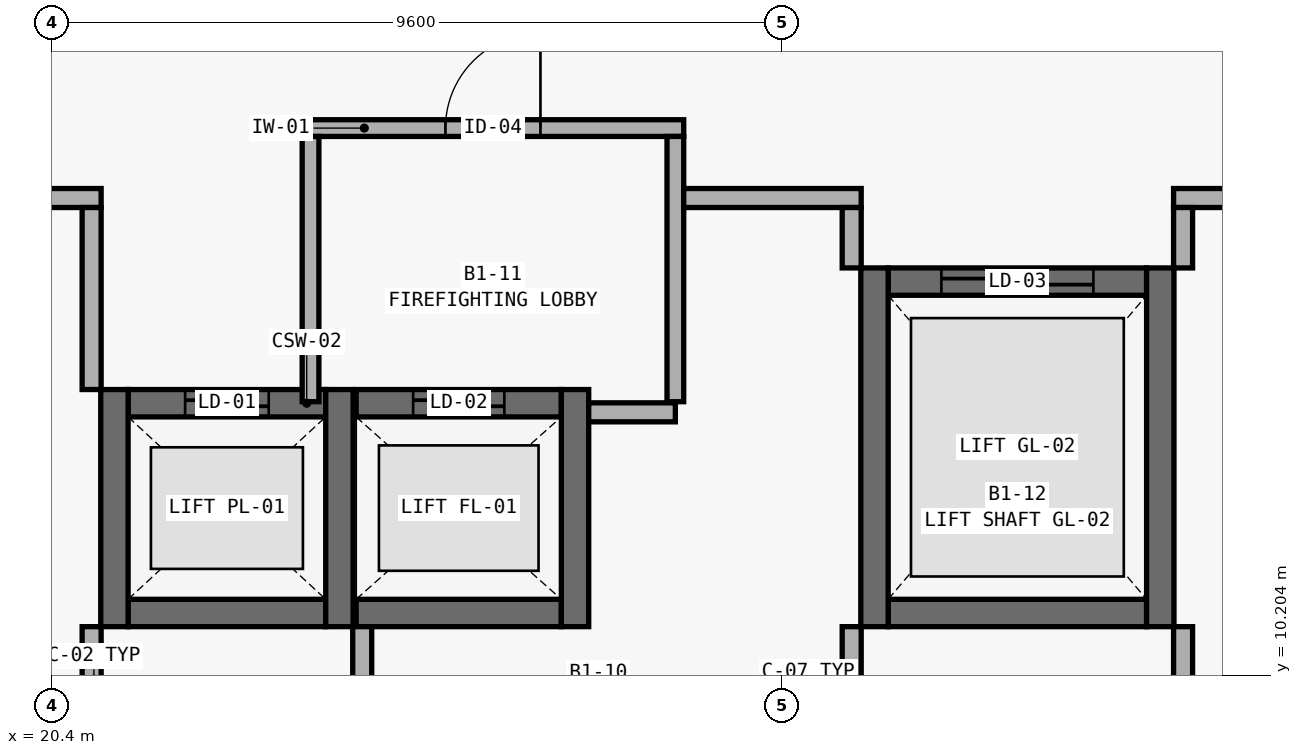
"""IFC4 building model, lengths in metres.
Left out: names, types, materials, properties, quantities, classifications, styles, units other than length and angle.
Written with IfcOpenShell. Run it as: python <this file> out.ifc"""

import sys

from ifc_helpers import new_model, si_unit, direction, frame, frame_2d, origin, place, context, subcontext, project, spatial, rectangle, extrude, element, fill, save


model = new_model("IFC4")
c1 = context("Model", 3, precision=1e-05, world=origin(), true_north=direction((0.0, 1.0)))
c2 = subcontext(c1, "Body", "Model", "MODEL_VIEW")
j1 = project(units=[si_unit("LENGTHUNIT", "METRE"), si_unit("PLANEANGLEUNIT", "RADIAN")], contexts=[c1])
p1 = place(None, origin())
s1 = spatial("IfcSite", under=j1, at=p1, CompositionType="ELEMENT")
p2 = place(p1, origin())
s2 = spatial("IfcBuilding", under=s1, at=p2, CompositionType="ELEMENT")
p3 = place(p2, frame((0.0, 0.0, -4.8)))
s3 = spatial("IfcBuildingStorey", under=s2, at=p3, CompositionType="ELEMENT", Elevation=-4.8)
p4 = place(p3, frame((21.4, 13.78, 0.0), z_axis=(0.0, 0.0, 1.0), x_axis=(1.0, 0.0, 0.0)))
e1 = element("IfcWall", 1, at=p4, inside=s3, PredefinedType="SHEAR", context=c2, shape_type="SweptSolid", body=[
    extrude(rectangle(XDim=2.6, YDim=0.36, at=frame_2d((1.3, 0.0))), origin(), (0.0, 0.0, 1.0), 4.38),
])
p5 = place(p4, frame((0.75, 0.0, 0.0)))
e2 = element("IfcOpeningElement", 2, at=p5, cuts=e1, PredefinedType="OPENING", context=c2, shape_type="SweptSolid", body=[
    extrude(rectangle(XDim=1.1, YDim=2.15, at=frame_2d((0.55, 1.075))), frame((0.0, 0.195, 0.0), z_axis=(0.0, -1.0, 0.0), x_axis=(1.0, 0.0, 0.0)), (0.0, 0.0, 1.0), 0.39),
])
p6 = place(p3, frame((21.4, 11.02, 0.0), z_axis=(0.0, 0.0, 1.0), x_axis=(1.0, 0.0, 0.0)))
e3 = element("IfcWall", 3, at=p6, inside=s3, PredefinedType="SHEAR", context=c2, shape_type="SweptSolid", body=[
    extrude(rectangle(XDim=2.6, YDim=0.36, at=frame_2d((1.3, 0.0))), origin(), (0.0, 0.0, 1.0), 4.38),
])
for number, where, z_axis, x_axis in (
    (4, (21.22, 10.84, 0.0), (0.0, 0.0, 1.0), (0.0, 1.0, 0.0)),
    (5, (24.18, 10.84, 0.0), (0.0, 0.0, 1.0), (0.0, 1.0, 0.0)),
):
    element("IfcWall", number, at=place(p3, frame(where, z_axis=z_axis, x_axis=x_axis)), inside=s3, PredefinedType="SHEAR", context=c2, shape_type="SweptSolid", body=[
        extrude(rectangle(XDim=3.12, YDim=0.36, at=frame_2d((1.56, 0.0))), origin(), (0.0, 0.0, 1.0), 4.38),
    ])
p7 = place(p3, frame((24.4, 13.78, 0.0), z_axis=(0.0, 0.0, 1.0), x_axis=(1.0, 0.0, 0.0)))
e6 = element("IfcWall", 6, at=p7, inside=s3, PredefinedType="SHEAR", context=c2, shape_type="SweptSolid", body=[
    extrude(rectangle(XDim=2.7, YDim=0.36, at=frame_2d((1.35, 0.0))), origin(), (0.0, 0.0, 1.0), 4.38),
])
p8 = place(p7, frame((0.75, 0.0, 0.0)))
e7 = element("IfcOpeningElement", 7, at=p8, cuts=e6, PredefinedType="OPENING", context=c2, shape_type="SweptSolid", body=[
    extrude(rectangle(XDim=1.2, YDim=2.15, at=frame_2d((0.6, 1.075))), frame((0.0, 0.195, 0.0), z_axis=(0.0, -1.0, 0.0), x_axis=(1.0, 0.0, 0.0)), (0.0, 0.0, 1.0), 0.39),
])
p9 = place(p3, frame((24.4, 11.02, 0.0), z_axis=(0.0, 0.0, 1.0), x_axis=(1.0, 0.0, 0.0)))
e8 = element("IfcWall", 8, at=p9, inside=s3, PredefinedType="SHEAR", context=c2, shape_type="SweptSolid", body=[
    extrude(rectangle(XDim=2.7, YDim=0.36, at=frame_2d((1.35, 0.0))), origin(), (0.0, 0.0, 1.0), 4.38),
])
p10 = place(p3, frame((27.28, 10.84, 0.0), z_axis=(0.0, 0.0, 1.0), x_axis=(0.0, 1.0, 0.0)))
e9 = element("IfcWall", 9, at=p10, inside=s3, PredefinedType="SHEAR", context=c2, shape_type="SweptSolid", body=[
    extrude(rectangle(XDim=3.12, YDim=0.36, at=frame_2d((1.56, 0.0))), origin(), (0.0, 0.0, 1.0), 4.38),
])
p11 = place(p3, frame((23.69, 17.4, 0.0), z_axis=(0.0, 0.0, 1.0), x_axis=(1.0, 0.0, 0.0)))
e10 = element("IfcWall", 10, at=p11, inside=s3, PredefinedType="PARTITIONING", context=c2, shape_type="SweptSolid", body=[
    extrude(rectangle(XDim=5.02, YDim=0.22, at=frame_2d((2.51, 0.0))), origin(), (0.0, 0.0, 1.0), 3.26),
])
p12 = place(p11, frame((1.885, 0.0, 0.0)))
e11 = element("IfcOpeningElement", 11, at=p12, cuts=e10, PredefinedType="OPENING", context=c2, shape_type="SweptSolid", body=[
    extrude(rectangle(XDim=1.25, YDim=2.15, at=frame_2d((0.625, 1.075))), frame((0.0, 0.125, 0.0), z_axis=(0.0, -1.0, 0.0), x_axis=(1.0, 0.0, 0.0)), (0.0, 0.0, 1.0), 0.25),
])
for number, where, z_axis, x_axis in (
    (12, (23.8, 13.8, 0.0), (0.0, 0.0, 1.0), (0.0, 1.0, 0.0)),
    (13, (28.6, 13.8, 0.0), (0.0, 0.0, 1.0), (0.0, 1.0, 0.0)),
):
    element("IfcWall", number, at=place(p3, frame(where, z_axis=z_axis, x_axis=x_axis)), inside=s3, PredefinedType="PARTITIONING", context=c2, shape_type="SweptSolid", body=[
        extrude(rectangle(XDim=3.49, YDim=0.22, at=frame_2d((1.745, 0.0))), origin(), (0.0, 0.0, 1.0), 3.26),
    ])
p13 = place(p3, frame((31.4, 15.38, 0.0), z_axis=(0.0, 0.0, 1.0), x_axis=(1.0, 0.0, 0.0)))
e14 = element("IfcWall", 14, at=p13, inside=s3, PredefinedType="SHEAR", context=c2, shape_type="SweptSolid", body=[
    extrude(rectangle(XDim=3.4, YDim=0.36, at=frame_2d((1.7, 0.0))), origin(), (0.0, 0.0, 1.0), 4.38),
])
p14 = place(p13, frame((0.7, 0.0, 0.0)))
e15 = element("IfcOpeningElement", 15, at=p14, cuts=e14, PredefinedType="OPENING", context=c2, shape_type="SweptSolid", body=[
    extrude(rectangle(XDim=2.0, YDim=2.4, at=frame_2d((1.0, 1.2))), frame((0.0, 0.195, 0.0), z_axis=(0.0, -1.0, 0.0), x_axis=(1.0, 0.0, 0.0)), (0.0, 0.0, 1.0), 0.39),
])
p15 = place(p3, frame((31.4, 11.02, 0.0), z_axis=(0.0, 0.0, 1.0), x_axis=(1.0, 0.0, 0.0)))
e16 = element("IfcWall", 16, at=p15, inside=s3, PredefinedType="SHEAR", context=c2, shape_type="SweptSolid", body=[
    extrude(rectangle(XDim=3.4, YDim=0.36, at=frame_2d((1.7, 0.0))), origin(), (0.0, 0.0, 1.0), 4.38),
])
for number, where, z_axis, x_axis in (
    (17, (31.22, 10.84, 0.0), (0.0, 0.0, 1.0), (0.0, 1.0, 0.0)),
    (18, (34.98, 10.84, 0.0), (0.0, 0.0, 1.0), (0.0, 1.0, 0.0)),
):
    element("IfcWall", number, at=place(p3, frame(where, z_axis=z_axis, x_axis=x_axis)), inside=s3, PredefinedType="SHEAR", context=c2, shape_type="SweptSolid", body=[
        extrude(rectangle(XDim=4.72, YDim=0.36, at=frame_2d((2.36, 0.0))), origin(), (0.0, 0.0, 1.0), 4.38),
    ])
p16 = place(p3, frame((27.46, 13.66, 0.0), z_axis=(0.0, 0.0, 1.0), x_axis=(1.0, 0.0, 0.0)))
e19 = element("IfcWall", 19, at=p16, inside=s3, PredefinedType="PARTITIONING", context=c2, shape_type="SweptSolid", body=[
    extrude(rectangle(XDim=1.14, YDim=0.25, at=frame_2d((0.57, 0.0))), origin(), (0.0, 0.0, 1.0), 3.26),
])
p17 = place(p3, frame((19.655, 16.48, 0.0), z_axis=(0.0, 0.0, 1.0), x_axis=(1.0, 0.0, 0.0)))
e20 = element("IfcWall", 20, at=p17, inside=s3, PredefinedType="PARTITIONING", context=c2, shape_type="SweptSolid", body=[
    extrude(rectangle(XDim=1.39, YDim=0.25, at=frame_2d((0.695, 0.0))), origin(), (0.0, 0.0, 1.0), 3.26),
])
p18 = place(p3, frame((28.71, 16.48, 0.0), z_axis=(0.0, 0.0, 1.0), x_axis=(1.0, 0.0, 0.0)))
e21 = element("IfcWall", 21, at=p18, inside=s3, PredefinedType="PARTITIONING", context=c2, shape_type="SweptSolid", body=[
    extrude(rectangle(XDim=2.335, YDim=0.25, at=frame_2d((1.167, 0.0))), origin(), (0.0, 0.0, 1.0), 3.26),
])
p19 = place(p3, frame((35.155, 16.48, 0.0), z_axis=(0.0, 0.0, 1.0), x_axis=(1.0, 0.0, 0.0)))
e22 = element("IfcWall", 22, at=p19, inside=s3, PredefinedType="PARTITIONING", context=c2, shape_type="SweptSolid", body=[
    extrude(rectangle(XDim=9.09, YDim=0.25, at=frame_2d((4.545, 0.0))), origin(), (0.0, 0.0, 1.0), 3.26),
])
p20 = place(p3, frame((20.92, 10.1, 0.0), z_axis=(0.0, 0.0, 1.0), x_axis=(0.0, 1.0, 0.0)))
e23 = element("IfcWall", 23, at=p20, inside=s3, PredefinedType="PARTITIONING", context=c2, shape_type="SweptSolid", body=[
    extrude(rectangle(XDim=0.74, YDim=0.25, at=frame_2d((0.37, 0.0))), origin(), (0.0, 0.0, 1.0), 3.26),
])
p21 = place(p3, frame((20.92, 13.96, 0.0), z_axis=(0.0, 0.0, 1.0), x_axis=(0.0, 1.0, 0.0)))
e24 = element("IfcWall", 24, at=p21, inside=s3, PredefinedType="PARTITIONING", context=c2, shape_type="SweptSolid", body=[
    extrude(rectangle(XDim=2.395, YDim=0.25, at=frame_2d((1.198, 0.0))), origin(), (0.0, 0.0, 1.0), 3.26),
])
for number, where, z_axis, x_axis in (
    (25, (24.48, 9.045, 0.0), (0.0, 0.0, 1.0), (0.0, 1.0, 0.0)),
    (26, (30.92, 9.045, 0.0), (0.0, 0.0, 1.0), (0.0, 1.0, 0.0)),
):
    element("IfcWall", number, at=place(p3, frame(where, z_axis=z_axis, x_axis=x_axis)), inside=s3, PredefinedType="PARTITIONING", context=c2, shape_type="SweptSolid", body=[
        extrude(rectangle(XDim=1.795, YDim=0.25, at=frame_2d((0.897, 0.0))), origin(), (0.0, 0.0, 1.0), 3.26),
    ])
p22 = place(p3, frame((30.92, 15.56, 0.0), z_axis=(0.0, 0.0, 1.0), x_axis=(0.0, 1.0, 0.0)))
e27 = element("IfcWall", 27, at=p22, inside=s3, PredefinedType="PARTITIONING", context=c2, shape_type="SweptSolid", body=[
    extrude(rectangle(XDim=0.795, YDim=0.25, at=frame_2d((0.397, 0.0))), origin(), (0.0, 0.0, 1.0), 3.26),
])
p23 = place(p3, frame((35.28, 9.045, 0.0), z_axis=(0.0, 0.0, 1.0), x_axis=(0.0, 1.0, 0.0)))
e28 = element("IfcWall", 28, at=p23, inside=s3, PredefinedType="PARTITIONING", context=c2, shape_type="SweptSolid", body=[
    extrude(rectangle(XDim=1.795, YDim=0.25, at=frame_2d((0.897, 0.0))), origin(), (0.0, 0.0, 1.0), 3.26),
])
p24 = place(p3, frame((35.28, 15.56, 0.0), z_axis=(0.0, 0.0, 1.0), x_axis=(0.0, 1.0, 0.0)))
e29 = element("IfcWall", 29, at=p24, inside=s3, PredefinedType="PARTITIONING", context=c2, shape_type="SweptSolid", body=[
    extrude(rectangle(XDim=0.795, YDim=0.25, at=frame_2d((0.397, 0.0))), origin(), (0.0, 0.0, 1.0), 3.26),
])
p25 = place(p5, origin())
e30 = element("IfcDoor", 30, at=p25, inside=s3, OperationType="DOUBLE_DOOR_SLIDING", PredefinedType="DOOR", context=c2, shape_type="SweptSolid", body=[
    extrude(rectangle(XDim=1.1, YDim=2.15, at=frame_2d((0.55, 1.075))), frame((0.0, 0.025, 0.0), z_axis=(0.0, -1.0, 0.0), x_axis=(1.0, 0.0, 0.0)), (0.0, 0.0, 1.0), 0.05),
])
fill(e2, e30)
p26 = place(p8, origin())
e31 = element("IfcDoor", 31, at=p26, inside=s3, OperationType="DOUBLE_DOOR_SLIDING", PredefinedType="DOOR", context=c2, shape_type="SweptSolid", body=[
    extrude(rectangle(XDim=1.2, YDim=2.15, at=frame_2d((0.6, 1.075))), frame((0.0, 0.025, 0.0), z_axis=(0.0, -1.0, 0.0), x_axis=(1.0, 0.0, 0.0)), (0.0, 0.0, 1.0), 0.05),
])
fill(e7, e31)
p27 = place(p12, origin())
e32 = element("IfcDoor", 32, at=p27, inside=s3, OperationType="SINGLE_SWING_RIGHT", PredefinedType="DOOR", context=c2, shape_type="SweptSolid", body=[
    extrude(rectangle(XDim=1.25, YDim=2.15, at=frame_2d((0.625, 1.075))), frame((0.0, 0.025, 0.0), z_axis=(0.0, -1.0, 0.0), x_axis=(1.0, 0.0, 0.0)), (0.0, 0.0, 1.0), 0.05),
])
fill(e11, e32)
p28 = place(p14, origin())
e33 = element("IfcDoor", 33, at=p28, inside=s3, OperationType="DOUBLE_DOOR_SLIDING", PredefinedType="DOOR", context=c2, shape_type="SweptSolid", body=[
    extrude(rectangle(XDim=2.0, YDim=2.4, at=frame_2d((1.0, 1.2))), frame((0.0, 0.025, 0.0), z_axis=(0.0, -1.0, 0.0), x_axis=(1.0, 0.0, 0.0)), (0.0, 0.0, 1.0), 0.05),
])
fill(e15, e33)
save(model, sys.argv[1])
